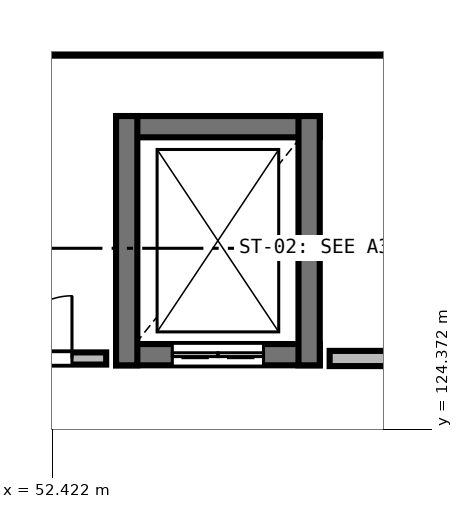
"""IFC4 building model, lengths in metres.
Left out: names, types, materials, properties, quantities, classifications, styles, units other than length and angle.
Written with IfcOpenShell. Run it as: python <this file> out.ifc"""

import sys

from ifc_helpers import new_model, si_unit, direction, frame, frame_2d, origin, place, context, subcontext, project, spatial, rectangle, extrude, element, fill, save


model = new_model("IFC4")
c1 = context("Model", 3, precision=1e-05, world=origin(), true_north=direction((0.0, 1.0)))
c2 = subcontext(c1, "Body", "Model", "MODEL_VIEW")
j1 = project(units=[si_unit("LENGTHUNIT", "METRE"), si_unit("PLANEANGLEUNIT", "RADIAN")], contexts=[c1])
p1 = place(None, origin())
s1 = spatial("IfcSite", under=j1, at=p1, CompositionType="ELEMENT")
p2 = place(p1, origin())
s2 = spatial("IfcBuilding", under=s1, at=p2, CompositionType="ELEMENT")
p3 = place(p2, frame((0.0, 0.0, 26.1)))
s3 = spatial("IfcBuildingStorey", under=s2, at=p3, CompositionType="ELEMENT", Elevation=26.1)
p4 = place(p3, frame((50.598, 129.43, 0.0), z_axis=(0.0, 0.0, 1.0), x_axis=(1.0, 0.0, 0.0)))
e1 = element("IfcWall", 1, at=p4, inside=s3, PredefinedType="SOLIDWALL", context=c2, shape_type="SweptSolid", body=[
    extrude(rectangle(XDim=7.979, YDim=0.29, at=frame_2d((3.99, 0.0))), origin(), (0.0, 0.0, 1.0), 3.59),
])
p5 = place(p3, frame((55.94, 125.35, 0.0), z_axis=(0.0, 0.0, 1.0), x_axis=(-1.0, 0.0, 0.0)))
e2 = element("IfcWall", 2, at=p5, inside=s3, PredefinedType="SHEAR", context=c2, shape_type="SweptSolid", body=[
    extrude(rectangle(XDim=2.68, YDim=0.28, at=frame_2d((1.34, 0.0))), origin(), (0.0, 0.0, 1.0), 3.96),
])
p6 = place(p5, frame((0.74, 0.0, 0.0)))
e3 = element("IfcOpeningElement", 3, at=p6, cuts=e2, PredefinedType="OPENING", context=c2, shape_type="SweptSolid", body=[
    extrude(rectangle(XDim=1.2, YDim=2.15, at=frame_2d((0.6, 1.075))), frame((0.0, 0.15, 0.0), z_axis=(0.0, -1.0, 0.0), x_axis=(1.0, 0.0, 0.0)), (0.0, 0.0, 1.0), 0.3),
])
p7 = place(p3, frame((53.26, 128.35, 0.0), z_axis=(0.0, 0.0, 1.0), x_axis=(1.0, 0.0, 0.0)))
e4 = element("IfcWall", 4, at=p7, inside=s3, PredefinedType="SHEAR", context=c2, shape_type="SweptSolid", body=[
    extrude(rectangle(XDim=2.68, YDim=0.28, at=frame_2d((1.34, 0.0))), origin(), (0.0, 0.0, 1.0), 3.96),
])
for number, where, z_axis, x_axis in (
    (5, (53.4, 125.21, 0.0), (0.0, 0.0, 1.0), (0.0, 1.0, 0.0)),
    (6, (55.8, 128.49, 0.0), (0.0, 0.0, 1.0), (0.0, -1.0, 0.0)),
):
    element("IfcWall", number, at=place(p3, frame(where, z_axis=z_axis, x_axis=x_axis)), inside=s3, PredefinedType="SHEAR", context=c2, shape_type="SweptSolid", body=[
        extrude(rectangle(XDim=3.28, YDim=0.28, at=frame_2d((1.64, 0.0))), origin(), (0.0, 0.0, 1.0), 3.96),
    ])
p8 = place(p3, frame((50.4, 125.3, 0.0), z_axis=(0.0, 0.0, 1.0), x_axis=(1.0, 0.0, 0.0)))
e7 = element("IfcWall", 7, at=p8, inside=s3, PredefinedType="PARTITIONING", context=c2, shape_type="SweptSolid", body=[
    extrude(rectangle(XDim=2.73, YDim=0.16, at=frame_2d((1.365, 0.0))), origin(), (0.0, 0.0, 1.0), 3.495),
])
p9 = place(p8, frame((0.63, 0.0, 0.0)))
e8 = element("IfcOpeningElement", 8, at=p9, cuts=e7, PredefinedType="OPENING", context=c2, shape_type="SweptSolid", body=[
    extrude(rectangle(XDim=1.65, YDim=2.2, at=frame_2d((0.825, 1.1))), frame((0.0, 0.09, 0.0), z_axis=(0.0, -1.0, 0.0), x_axis=(1.0, 0.0, 0.0)), (0.0, 0.0, 1.0), 0.18),
])
p10 = place(p3, frame((56.07, 125.3, 0.0), z_axis=(0.0, 0.0, 1.0), x_axis=(1.0, 0.0, 0.0)))
e9 = element("IfcWall", 9, at=p10, inside=s3, PredefinedType="SOLIDWALL", context=c2, shape_type="SweptSolid", body=[
    extrude(rectangle(XDim=19.31, YDim=0.2, at=frame_2d((9.655, 0.0))), origin(), (0.0, 0.0, 1.0), 3.495),
])
p11 = place(p6, origin())
e10 = element("IfcDoor", 10, at=p11, inside=s3, OperationType="DOUBLE_DOOR_SLIDING", PredefinedType="DOOR", context=c2, shape_type="SweptSolid", body=[
    extrude(rectangle(XDim=1.2, YDim=2.15, at=frame_2d((0.6, 1.075))), frame((0.0, 0.025, 0.0), z_axis=(0.0, -1.0, 0.0), x_axis=(1.0, 0.0, 0.0)), (0.0, 0.0, 1.0), 0.05),
])
fill(e3, e10)
p12 = place(p9, origin())
e11 = element("IfcDoor", 11, at=p12, inside=s3, OperationType="DOUBLE_DOOR_SINGLE_SWING", PredefinedType="DOOR", context=c2, shape_type="SweptSolid", body=[
    extrude(rectangle(XDim=1.65, YDim=2.2, at=frame_2d((0.825, 1.1))), frame((0.0, 0.025, 0.0), z_axis=(0.0, -1.0, 0.0), x_axis=(1.0, 0.0, 0.0)), (0.0, 0.0, 1.0), 0.05),
])
fill(e8, e11)
save(model, sys.argv[1])
